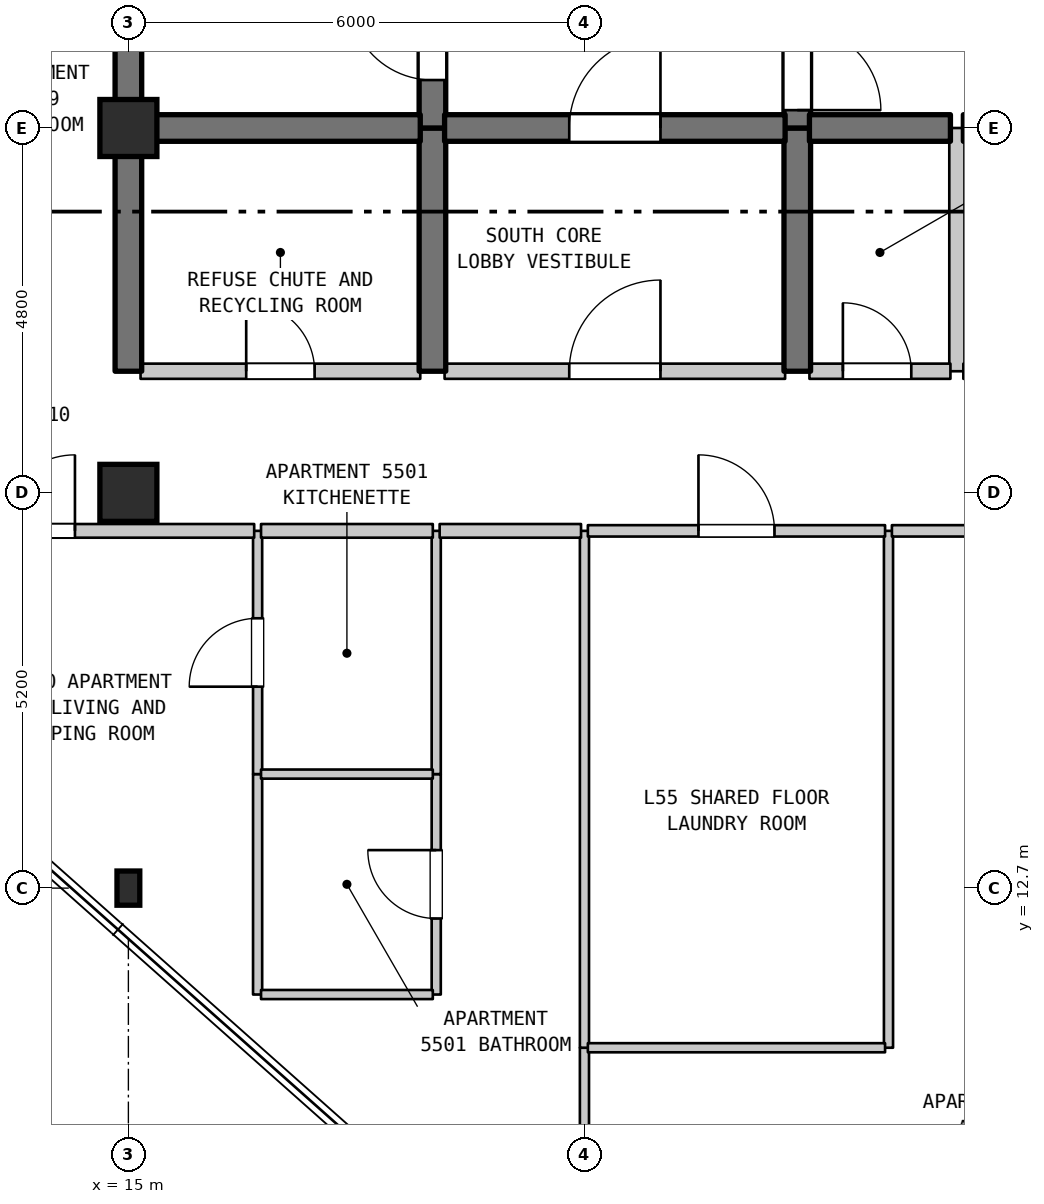
"""IFC4 building model, lengths in metres.
Left out: names, types, materials, properties, quantities, classifications, styles, units other than length and angle.
Written with IfcOpenShell. Run it as: python <this file> out.ifc"""

import sys

from ifc_helpers import new_model, si_unit, direction, frame, frame_2d, origin, origin_2d, place, context, subcontext, project, spatial, rectangle, i_section, extrude, element, fill, save


model = new_model("IFC4")
c1 = context("Model", 3, precision=1e-05, world=origin(), true_north=direction((0.0, 1.0)))
c2 = subcontext(c1, "Body", "Model", "MODEL_VIEW")
j1 = project(units=[si_unit("LENGTHUNIT", "METRE"), si_unit("PLANEANGLEUNIT", "RADIAN")], contexts=[c1])
p1 = place(None, origin())
s1 = spatial("IfcSite", under=j1, at=p1, CompositionType="ELEMENT")
p2 = place(p1, origin())
s2 = spatial("IfcBuilding", under=s1, at=p2, CompositionType="ELEMENT")
p3 = place(p2, frame((0.0, 0.0, 222.8)))
s3 = spatial("IfcBuildingStorey", under=s2, at=p3, CompositionType="ELEMENT", Elevation=222.8)
p4 = place(p3, frame((15.0, 12.7, 0.0), z_axis=(0.0, 0.0, 1.0), x_axis=(1.0, 0.0, 0.0)))
e1 = element("IfcColumn", 1, at=p4, inside=s3, PredefinedType="COLUMN", context=c2, shape_type="SweptSolid", body=[
    extrude(i_section(OverallWidth=0.3, OverallDepth=0.45, WebThickness=0.014, FlangeThickness=0.026, FilletRadius=0.027, at=origin_2d()), origin(), (0.0, 0.0, 1.0), 3.7),
])
for number, where, z_axis, x_axis in (
    (2, (15.0, 17.9, 0.0), (0.0, 0.0, 1.0), (1.0, 0.0, 0.0)),
    (3, (15.0, 22.7, 0.0), (0.0, 0.0, 1.0), (1.0, 0.0, 0.0)),
):
    element("IfcColumn", number, at=place(p3, frame(where, z_axis=z_axis, x_axis=x_axis)), inside=s3, PredefinedType="COLUMN", context=c2, shape_type="SweptSolid", body=[
        extrude(rectangle(XDim=0.75, YDim=0.75, at=origin_2d()), origin(), (0.0, 0.0, 1.0), 3.7),
    ])
p5 = place(p3, frame((15.0, 19.5, 0.0), z_axis=(0.0, 0.0, 1.0), x_axis=(0.0, 1.0, 0.0)))
e4 = element("IfcWall", 4, at=p5, inside=s3, PredefinedType="SHEAR", context=c2, shape_type="SweptSolid", body=[
    extrude(rectangle(XDim=3.2, YDim=0.35, at=frame_2d((1.6, 0.0))), origin(), (0.0, 0.0, 1.0), 3.39),
])
p6 = place(p3, frame((15.0, 22.7, 0.0), z_axis=(0.0, 0.0, 1.0), x_axis=(0.0, 1.0, 0.0)))
e5 = element("IfcWall", 5, at=p6, inside=s3, PredefinedType="SHEAR", context=c2, shape_type="SweptSolid", body=[
    extrude(rectangle(XDim=6.8, YDim=0.35, at=frame_2d((3.4, 0.0))), origin(), (0.0, 0.0, 1.0), 3.39),
])
p7 = place(p3, frame((16.7, 11.3, 0.0), z_axis=(0.0, 0.0, 1.0), x_axis=(0.0, 1.0, 0.0)))
e6 = element("IfcWall", 6, at=p7, inside=s3, PredefinedType="PARTITIONING", context=c2, shape_type="SweptSolid", body=[
    extrude(rectangle(XDim=2.9, YDim=0.12, at=frame_2d((1.45, 0.0))), origin(), (0.0, 0.0, 1.0), 3.39),
])
p8 = place(p3, frame((16.7, 14.2, 0.0), z_axis=(0.0, 0.0, 1.0), x_axis=(0.0, 1.0, 0.0)))
e7 = element("IfcWall", 7, at=p8, inside=s3, PredefinedType="PARTITIONING", context=c2, shape_type="SweptSolid", body=[
    extrude(rectangle(XDim=3.2, YDim=0.12, at=frame_2d((1.6, 0.0))), origin(), (0.0, 0.0, 1.0), 3.39),
])
p9 = place(p8, frame((1.15, 0.0, 0.0)))
e8 = element("IfcOpeningElement", 8, at=p9, cuts=e7, PredefinedType="OPENING", context=c2, shape_type="SweptSolid", body=[
    extrude(rectangle(XDim=0.9, YDim=2.15, at=frame_2d((0.45, 1.075))), frame((0.0, 0.07, 0.0), z_axis=(0.0, -1.0, 0.0), x_axis=(1.0, 0.0, 0.0)), (0.0, 0.0, 1.0), 0.14),
])
p10 = place(p3, frame((19.0, 19.5, 0.0), z_axis=(0.0, 0.0, 1.0), x_axis=(0.0, 1.0, 0.0)))
e9 = element("IfcWall", 9, at=p10, inside=s3, PredefinedType="SHEAR", context=c2, shape_type="SweptSolid", body=[
    extrude(rectangle(XDim=3.2, YDim=0.35, at=frame_2d((1.6, 0.0))), origin(), (0.0, 0.0, 1.0), 3.39),
])
p11 = place(p3, frame((19.0, 22.7, 0.0), z_axis=(0.0, 0.0, 1.0), x_axis=(0.0, 1.0, 0.0)))
e10 = element("IfcWall", 10, at=p11, inside=s3, PredefinedType="SHEAR", context=c2, shape_type="SweptSolid", body=[
    extrude(rectangle(XDim=5.5, YDim=0.35, at=frame_2d((2.75, 0.0))), origin(), (0.0, 0.0, 1.0), 3.39),
])
p12 = place(p11, frame((0.631, 0.0, 0.0)))
e11 = element("IfcOpeningElement", 11, at=p12, cuts=e10, PredefinedType="OPENING", context=c2, shape_type="SweptSolid", body=[
    extrude(rectangle(XDim=1.1, YDim=2.15, at=frame_2d((0.55, 1.075))), frame((0.0, 0.185, 0.0), z_axis=(0.0, -1.0, 0.0), x_axis=(1.0, 0.0, 0.0)), (0.0, 0.0, 1.0), 0.37),
])
p13 = place(p3, frame((19.05, 11.3, 0.0), z_axis=(0.0, 0.0, 1.0), x_axis=(0.0, 1.0, 0.0)))
e12 = element("IfcWall", 12, at=p13, inside=s3, PredefinedType="PARTITIONING", context=c2, shape_type="SweptSolid", body=[
    extrude(rectangle(XDim=2.9, YDim=0.12, at=frame_2d((1.45, 0.0))), origin(), (0.0, 0.0, 1.0), 3.39),
])
p14 = place(p13, frame((1.0, 0.0, 0.0)))
e13 = element("IfcOpeningElement", 13, at=p14, cuts=e12, PredefinedType="OPENING", context=c2, shape_type="SweptSolid", body=[
    extrude(rectangle(XDim=0.9, YDim=2.1, at=frame_2d((0.45, 1.05))), frame((0.0, 0.07, 0.0), z_axis=(0.0, -1.0, 0.0), x_axis=(1.0, 0.0, 0.0)), (0.0, 0.0, 1.0), 0.14),
])
p15 = place(p3, frame((19.05, 14.2, 0.0), z_axis=(0.0, 0.0, 1.0), x_axis=(0.0, 1.0, 0.0)))
e14 = element("IfcWall", 14, at=p15, inside=s3, PredefinedType="PARTITIONING", context=c2, shape_type="SweptSolid", body=[
    extrude(rectangle(XDim=3.2, YDim=0.12, at=frame_2d((1.6, 0.0))), origin(), (0.0, 0.0, 1.0), 3.39),
])
p16 = place(p3, frame((21.0, 6.71, 0.0), z_axis=(0.0, 0.0, 1.0), x_axis=(0.0, 1.0, 0.0)))
e15 = element("IfcWall", 15, at=p16, inside=s3, PredefinedType="PARTITIONING", context=c2, shape_type="SweptSolid", body=[
    extrude(rectangle(XDim=3.89, YDim=0.12, at=frame_2d((1.945, 0.0))), origin(), (0.0, 0.0, 1.0), 3.39),
])
p17 = place(p3, frame((21.0, 10.6, 0.0), z_axis=(0.0, 0.0, 1.0), x_axis=(0.0, 1.0, 0.0)))
e16 = element("IfcWall", 16, at=p17, inside=s3, PredefinedType="PARTITIONING", context=c2, shape_type="SweptSolid", body=[
    extrude(rectangle(XDim=6.8, YDim=0.12, at=frame_2d((3.4, 0.0))), origin(), (0.0, 0.0, 1.0), 3.39),
])
p18 = place(p3, frame((23.8, 19.5, 0.0), z_axis=(0.0, 0.0, 1.0), x_axis=(0.0, 1.0, 0.0)))
e17 = element("IfcWall", 17, at=p18, inside=s3, PredefinedType="SHEAR", context=c2, shape_type="SweptSolid", body=[
    extrude(rectangle(XDim=3.2, YDim=0.35, at=frame_2d((1.6, 0.0))), origin(), (0.0, 0.0, 1.0), 3.39),
])
p19 = place(p3, frame((23.8, 22.7, 0.0), z_axis=(0.0, 0.0, 1.0), x_axis=(0.0, 1.0, 0.0)))
e18 = element("IfcWall", 18, at=p19, inside=s3, PredefinedType="SHEAR", context=c2, shape_type="SweptSolid", body=[
    extrude(rectangle(XDim=5.5, YDim=0.35, at=frame_2d((2.75, 0.0))), origin(), (0.0, 0.0, 1.0), 3.39),
])
p20 = place(p19, frame((0.235, 0.0, 0.0)))
e19 = element("IfcOpeningElement", 19, at=p20, cuts=e18, PredefinedType="OPENING", context=c2, shape_type="SweptSolid", body=[
    extrude(rectangle(XDim=1.1, YDim=2.15, at=frame_2d((0.55, 1.075))), frame((0.0, 0.185, 0.0), z_axis=(0.0, -1.0, 0.0), x_axis=(1.0, 0.0, 0.0)), (0.0, 0.0, 1.0), 0.37),
])
p21 = place(p3, frame((25.0, 10.6, 0.0), z_axis=(0.0, 0.0, 1.0), x_axis=(0.0, 1.0, 0.0)))
e20 = element("IfcWall", 20, at=p21, inside=s3, PredefinedType="PARTITIONING", context=c2, shape_type="SweptSolid", body=[
    extrude(rectangle(XDim=6.8, YDim=0.12, at=frame_2d((3.4, 0.0))), origin(), (0.0, 0.0, 1.0), 3.39),
])
p22 = place(p3, frame((25.9, 19.5, 0.0), z_axis=(0.0, 0.0, 1.0), x_axis=(0.0, 1.0, 0.0)))
e21 = element("IfcWall", 21, at=p22, inside=s3, PredefinedType="STANDARD", context=c2, shape_type="SweptSolid", body=[
    extrude(rectangle(XDim=3.2, YDim=0.2, at=frame_2d((1.6, 0.0))), origin(), (0.0, 0.0, 1.0), 3.39),
])
p23 = place(p3, frame((21.045, 10.6, 0.0), z_axis=(0.0, 0.0, 1.0), x_axis=(1.0, 0.0, 0.0)))
e22 = element("IfcWall", 22, at=p23, inside=s3, PredefinedType="PARTITIONING", context=c2, shape_type="SweptSolid", body=[
    extrude(rectangle(XDim=3.91, YDim=0.12, at=frame_2d((1.955, 0.0))), origin(), (0.0, 0.0, 1.0), 3.39),
])
for number, where, z_axis, x_axis in (
    (23, (16.745, 11.3, 0.0), (0.0, 0.0, 1.0), (1.0, 0.0, 0.0)),
    (24, (16.745, 14.2, 0.0), (0.0, 0.0, 1.0), (1.0, 0.0, 0.0)),
):
    element("IfcWall", number, at=place(p3, frame(where, z_axis=z_axis, x_axis=x_axis)), inside=s3, PredefinedType="PARTITIONING", context=c2, shape_type="SweptSolid", body=[
        extrude(rectangle(XDim=2.26, YDim=0.12, at=frame_2d((1.13, 0.0))), origin(), (0.0, 0.0, 1.0), 3.39),
    ])
p24 = place(p3, frame((12.975, 17.4, 0.0), z_axis=(0.0, 0.0, 1.0), x_axis=(1.0, 0.0, 0.0)))
e25 = element("IfcWall", 25, at=p24, inside=s3, PredefinedType="STANDARD", context=c2, shape_type="SweptSolid", body=[
    extrude(rectangle(XDim=3.68, YDim=0.18, at=frame_2d((1.84, 0.0))), origin(), (0.0, 0.0, 1.0), 3.39),
])
p25 = place(p24, frame((0.322, 0.0, 0.0)))
e26 = element("IfcOpeningElement", 26, at=p25, cuts=e25, PredefinedType="OPENING", context=c2, shape_type="SweptSolid", body=[
    extrude(rectangle(XDim=1.0, YDim=2.15, at=frame_2d((0.5, 1.075))), frame((0.0, 0.1, 0.0), z_axis=(0.0, -1.0, 0.0), x_axis=(1.0, 0.0, 0.0)), (0.0, 0.0, 1.0), 0.2),
])
p26 = place(p3, frame((16.745, 17.4, 0.0), z_axis=(0.0, 0.0, 1.0), x_axis=(1.0, 0.0, 0.0)))
e27 = element("IfcWall", 27, at=p26, inside=s3, PredefinedType="STANDARD", context=c2, shape_type="SweptSolid", body=[
    extrude(rectangle(XDim=2.26, YDim=0.18, at=frame_2d((1.13, 0.0))), origin(), (0.0, 0.0, 1.0), 3.39),
])
p27 = place(p3, frame((19.095, 17.4, 0.0), z_axis=(0.0, 0.0, 1.0), x_axis=(1.0, 0.0, 0.0)))
e28 = element("IfcWall", 28, at=p27, inside=s3, PredefinedType="STANDARD", context=c2, shape_type="SweptSolid", body=[
    extrude(rectangle(XDim=1.86, YDim=0.18, at=frame_2d((0.93, 0.0))), origin(), (0.0, 0.0, 1.0), 3.39),
])
p28 = place(p3, frame((21.045, 17.4, 0.0), z_axis=(0.0, 0.0, 1.0), x_axis=(1.0, 0.0, 0.0)))
e29 = element("IfcWall", 29, at=p28, inside=s3, PredefinedType="STANDARD", context=c2, shape_type="SweptSolid", body=[
    extrude(rectangle(XDim=3.91, YDim=0.15, at=frame_2d((1.955, 0.0))), origin(), (0.0, 0.0, 1.0), 3.39),
])
p29 = place(p28, frame((1.455, 0.0, 0.0)))
e30 = element("IfcOpeningElement", 30, at=p29, cuts=e29, PredefinedType="OPENING", context=c2, shape_type="SweptSolid", body=[
    extrude(rectangle(XDim=1.0, YDim=2.15, at=frame_2d((0.5, 1.075))), frame((0.0, 0.085, 0.0), z_axis=(0.0, -1.0, 0.0), x_axis=(1.0, 0.0, 0.0)), (0.0, 0.0, 1.0), 0.17),
])
p30 = place(p3, frame((25.045, 17.4, 0.0), z_axis=(0.0, 0.0, 1.0), x_axis=(1.0, 0.0, 0.0)))
e31 = element("IfcWall", 31, at=p30, inside=s3, PredefinedType="STANDARD", context=c2, shape_type="SweptSolid", body=[
    extrude(rectangle(XDim=4.11, YDim=0.15, at=frame_2d((2.055, 0.0))), origin(), (0.0, 0.0, 1.0), 3.39),
])
p31 = place(p30, frame((1.483, 0.0, 0.0)))
e32 = element("IfcOpeningElement", 32, at=p31, cuts=e31, PredefinedType="OPENING", context=c2, shape_type="SweptSolid", body=[
    extrude(rectangle(XDim=1.0, YDim=2.15, at=frame_2d((0.5, 1.075))), frame((0.0, 0.085, 0.0), z_axis=(0.0, -1.0, 0.0), x_axis=(1.0, 0.0, 0.0)), (0.0, 0.0, 1.0), 0.17),
])
p32 = place(p3, frame((15.16, 19.5, 0.0), z_axis=(0.0, 0.0, 1.0), x_axis=(1.0, 0.0, 0.0)))
e33 = element("IfcWall", 33, at=p32, inside=s3, PredefinedType="STANDARD", context=c2, shape_type="SweptSolid", body=[
    extrude(rectangle(XDim=3.68, YDim=0.2, at=frame_2d((1.84, 0.0))), origin(), (0.0, 0.0, 1.0), 3.39),
])
p33 = place(p32, frame((1.39, 0.0, 0.0)))
e34 = element("IfcOpeningElement", 34, at=p33, cuts=e33, PredefinedType="OPENING", context=c2, shape_type="SweptSolid", body=[
    extrude(rectangle(XDim=0.9, YDim=2.15, at=frame_2d((0.45, 1.075))), frame((0.0, 0.11, 0.0), z_axis=(0.0, -1.0, 0.0), x_axis=(1.0, 0.0, 0.0)), (0.0, 0.0, 1.0), 0.22),
])
p34 = place(p3, frame((19.16, 19.5, 0.0), z_axis=(0.0, 0.0, 1.0), x_axis=(1.0, 0.0, 0.0)))
e35 = element("IfcWall", 35, at=p34, inside=s3, PredefinedType="STANDARD", context=c2, shape_type="SweptSolid", body=[
    extrude(rectangle(XDim=4.48, YDim=0.2, at=frame_2d((2.24, 0.0))), origin(), (0.0, 0.0, 1.0), 3.39),
])
p35 = place(p34, frame((1.64, 0.0, 0.0)))
e36 = element("IfcOpeningElement", 36, at=p35, cuts=e35, PredefinedType="OPENING", context=c2, shape_type="SweptSolid", body=[
    extrude(rectangle(XDim=1.2, YDim=2.2, at=frame_2d((0.6, 1.1))), frame((0.0, 0.11, 0.0), z_axis=(0.0, -1.0, 0.0), x_axis=(1.0, 0.0, 0.0)), (0.0, 0.0, 1.0), 0.22),
])
p36 = place(p3, frame((23.96, 19.5, 0.0), z_axis=(0.0, 0.0, 1.0), x_axis=(1.0, 0.0, 0.0)))
e37 = element("IfcWall", 37, at=p36, inside=s3, PredefinedType="STANDARD", context=c2, shape_type="SweptSolid", body=[
    extrude(rectangle(XDim=1.855, YDim=0.2, at=frame_2d((0.927, 0.0))), origin(), (0.0, 0.0, 1.0), 3.39),
])
p37 = place(p36, frame((0.44, 0.0, 0.0)))
e38 = element("IfcOpeningElement", 38, at=p37, cuts=e37, PredefinedType="OPENING", context=c2, shape_type="SweptSolid", body=[
    extrude(rectangle(XDim=0.9, YDim=2.15, at=frame_2d((0.45, 1.075))), frame((0.0, 0.11, 0.0), z_axis=(0.0, -1.0, 0.0), x_axis=(1.0, 0.0, 0.0)), (0.0, 0.0, 1.0), 0.22),
])
p38 = place(p3, frame((25.985, 19.5, 0.0), z_axis=(0.0, 0.0, 1.0), x_axis=(1.0, 0.0, 0.0)))
e39 = element("IfcWall", 39, at=p38, inside=s3, PredefinedType="STANDARD", context=c2, shape_type="SweptSolid", body=[
    extrude(rectangle(XDim=4.655, YDim=0.2, at=frame_2d((2.327, 0.0))), origin(), (0.0, 0.0, 1.0), 3.39),
])
p39 = place(p38, frame((1.845, 0.0, 0.0)))
e40 = element("IfcOpeningElement", 40, at=p39, cuts=e39, PredefinedType="OPENING", context=c2, shape_type="SweptSolid", body=[
    extrude(rectangle(XDim=0.9, YDim=2.15, at=frame_2d((0.45, 1.075))), frame((0.0, 0.11, 0.0), z_axis=(0.0, -1.0, 0.0), x_axis=(1.0, 0.0, 0.0)), (0.0, 0.0, 1.0), 0.22),
])
p40 = place(p3, frame((15.16, 22.7, 0.0), z_axis=(0.0, 0.0, 1.0), x_axis=(1.0, 0.0, 0.0)))
e41 = element("IfcWall", 41, at=p40, inside=s3, PredefinedType="SHEAR", context=c2, shape_type="SweptSolid", body=[
    extrude(rectangle(XDim=3.68, YDim=0.35, at=frame_2d((1.84, 0.0))), origin(), (0.0, 0.0, 1.0), 3.39),
])
p41 = place(p3, frame((19.16, 22.7, 0.0), z_axis=(0.0, 0.0, 1.0), x_axis=(1.0, 0.0, 0.0)))
e42 = element("IfcWall", 42, at=p41, inside=s3, PredefinedType="SHEAR", context=c2, shape_type="SweptSolid", body=[
    extrude(rectangle(XDim=4.48, YDim=0.35, at=frame_2d((2.24, 0.0))), origin(), (0.0, 0.0, 1.0), 3.39),
])
p42 = place(p41, frame((1.64, 0.0, 0.0)))
e43 = element("IfcOpeningElement", 43, at=p42, cuts=e42, PredefinedType="OPENING", context=c2, shape_type="SweptSolid", body=[
    extrude(rectangle(XDim=1.2, YDim=2.2, at=frame_2d((0.6, 1.1))), frame((0.0, 0.185, 0.0), z_axis=(0.0, -1.0, 0.0), x_axis=(1.0, 0.0, 0.0)), (0.0, 0.0, 1.0), 0.37),
])
p43 = place(p3, frame((23.96, 22.7, 0.0), z_axis=(0.0, 0.0, 1.0), x_axis=(1.0, 0.0, 0.0)))
e44 = element("IfcWall", 44, at=p43, inside=s3, PredefinedType="SHEAR", context=c2, shape_type="SweptSolid", body=[
    extrude(rectangle(XDim=1.855, YDim=0.35, at=frame_2d((0.927, 0.0))), origin(), (0.0, 0.0, 1.0), 3.39),
])
p44 = place(p3, frame((25.985, 22.7, 0.0), z_axis=(0.0, 0.0, 1.0), x_axis=(1.0, 0.0, 0.0)))
e45 = element("IfcWall", 45, at=p44, inside=s3, PredefinedType="SHEAR", context=c2, shape_type="SweptSolid", body=[
    extrude(rectangle(XDim=1.155, YDim=0.35, at=frame_2d((0.577, 0.0))), origin(), (0.0, 0.0, 1.0), 3.39),
])
p45 = place(p9, origin())
e46 = element("IfcDoor", 46, at=p45, inside=s3, OperationType="SINGLE_SWING_LEFT", PredefinedType="DOOR", context=c2, shape_type="SweptSolid", body=[
    extrude(rectangle(XDim=0.9, YDim=2.15, at=frame_2d((0.45, 1.075))), frame((0.0, 0.025, 0.0), z_axis=(0.0, -1.0, 0.0), x_axis=(1.0, 0.0, 0.0)), (0.0, 0.0, 1.0), 0.05),
])
fill(e8, e46)
p46 = place(p12, origin())
e47 = element("IfcDoor", 47, at=p46, inside=s3, OperationType="SINGLE_SWING_RIGHT", PredefinedType="DOOR", context=c2, shape_type="SweptSolid", body=[
    extrude(rectangle(XDim=1.1, YDim=2.15, at=frame_2d((0.55, 1.075))), frame((0.0, 0.025, 0.0), z_axis=(0.0, -1.0, 0.0), x_axis=(1.0, 0.0, 0.0)), (0.0, 0.0, 1.0), 0.05),
])
fill(e11, e47)
p47 = place(p14, origin())
e48 = element("IfcDoor", 48, at=p47, inside=s3, OperationType="SINGLE_SWING_RIGHT", PredefinedType="DOOR", context=c2, shape_type="SweptSolid", body=[
    extrude(rectangle(XDim=0.9, YDim=2.1, at=frame_2d((0.45, 1.05))), frame((0.0, 0.025, 0.0), z_axis=(0.0, -1.0, 0.0), x_axis=(1.0, 0.0, 0.0)), (0.0, 0.0, 1.0), 0.05),
])
fill(e13, e48)
p48 = place(p20, frame((1.1, 0.0, 0.0), z_axis=(0.0, 0.0, 1.0), x_axis=(-1.0, 0.0, 0.0)))
e49 = element("IfcDoor", 49, at=p48, inside=s3, OperationType="SINGLE_SWING_LEFT", PredefinedType="DOOR", context=c2, shape_type="SweptSolid", body=[
    extrude(rectangle(XDim=1.1, YDim=2.15, at=frame_2d((0.55, 1.075))), frame((0.0, 0.025, 0.0), z_axis=(0.0, -1.0, 0.0), x_axis=(1.0, 0.0, 0.0)), (0.0, 0.0, 1.0), 0.05),
])
fill(e19, e49)
p49 = place(p25, origin())
e50 = element("IfcDoor", 50, at=p49, inside=s3, OperationType="SINGLE_SWING_RIGHT", PredefinedType="DOOR", context=c2, shape_type="SweptSolid", body=[
    extrude(rectangle(XDim=1.0, YDim=2.15, at=frame_2d((0.5, 1.075))), frame((0.0, 0.025, 0.0), z_axis=(0.0, -1.0, 0.0), x_axis=(1.0, 0.0, 0.0)), (0.0, 0.0, 1.0), 0.05),
])
fill(e26, e50)
p50 = place(p29, origin())
e51 = element("IfcDoor", 51, at=p50, inside=s3, OperationType="SINGLE_SWING_LEFT", PredefinedType="DOOR", context=c2, shape_type="SweptSolid", body=[
    extrude(rectangle(XDim=1.0, YDim=2.15, at=frame_2d((0.5, 1.075))), frame((0.0, 0.025, 0.0), z_axis=(0.0, -1.0, 0.0), x_axis=(1.0, 0.0, 0.0)), (0.0, 0.0, 1.0), 0.05),
])
fill(e30, e51)
p51 = place(p33, origin())
e52 = element("IfcDoor", 52, at=p51, inside=s3, OperationType="SINGLE_SWING_LEFT", PredefinedType="DOOR", context=c2, shape_type="SweptSolid", body=[
    extrude(rectangle(XDim=0.9, YDim=2.15, at=frame_2d((0.45, 1.075))), frame((0.0, 0.025, 0.0), z_axis=(0.0, -1.0, 0.0), x_axis=(1.0, 0.0, 0.0)), (0.0, 0.0, 1.0), 0.05),
])
fill(e34, e52)
p52 = place(p35, origin())
e53 = element("IfcDoor", 53, at=p52, inside=s3, OperationType="SINGLE_SWING_RIGHT", PredefinedType="DOOR", context=c2, shape_type="SweptSolid", body=[
    extrude(rectangle(XDim=1.2, YDim=2.2, at=frame_2d((0.6, 1.1))), frame((0.0, 0.025, 0.0), z_axis=(0.0, -1.0, 0.0), x_axis=(1.0, 0.0, 0.0)), (0.0, 0.0, 1.0), 0.05),
])
fill(e36, e53)
p53 = place(p37, origin())
e54 = element("IfcDoor", 54, at=p53, inside=s3, OperationType="SINGLE_SWING_LEFT", PredefinedType="DOOR", context=c2, shape_type="SweptSolid", body=[
    extrude(rectangle(XDim=0.9, YDim=2.15, at=frame_2d((0.45, 1.075))), frame((0.0, 0.025, 0.0), z_axis=(0.0, -1.0, 0.0), x_axis=(1.0, 0.0, 0.0)), (0.0, 0.0, 1.0), 0.05),
])
fill(e38, e54)
p54 = place(p42, origin())
e55 = element("IfcDoor", 55, at=p54, inside=s3, OperationType="SINGLE_SWING_RIGHT", PredefinedType="DOOR", context=c2, shape_type="SweptSolid", body=[
    extrude(rectangle(XDim=1.2, YDim=2.2, at=frame_2d((0.6, 1.1))), frame((0.0, 0.025, 0.0), z_axis=(0.0, -1.0, 0.0), x_axis=(1.0, 0.0, 0.0)), (0.0, 0.0, 1.0), 0.05),
])
fill(e43, e55)
save(model, sys.argv[1])
